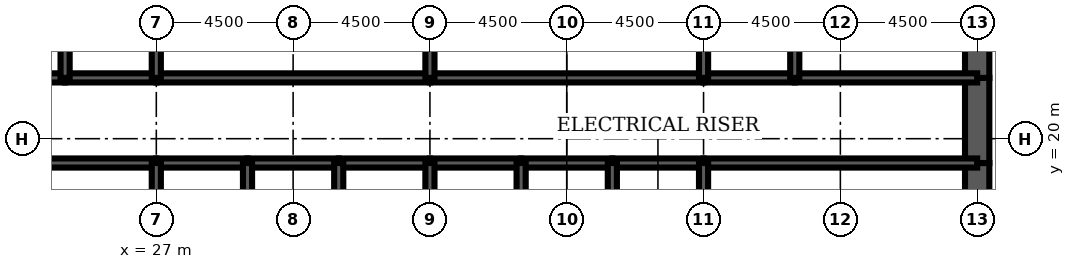
"""IFC4 building model, lengths in metres.
Left out: names, types, materials, properties, quantities, classifications, styles, units other than length and angle.
Written with IfcOpenShell. Run it as: python <this file> out.ifc"""

import sys

from ifc_helpers import new_model, si_unit, direction, frame, frame_2d, origin, place, context, subcontext, project, spatial, rectangle, extrude, element, fill, save


model = new_model("IFC4")
c1 = context("Model", 3, precision=1e-05, world=origin(), true_north=direction((0.0, 1.0)))
c2 = subcontext(c1, "Body", "Model", "MODEL_VIEW")
j1 = project(units=[si_unit("LENGTHUNIT", "METRE"), si_unit("PLANEANGLEUNIT", "RADIAN")], contexts=[c1])
p1 = place(None, origin())
s1 = spatial("IfcSite", under=j1, at=p1, CompositionType="ELEMENT")
p2 = place(p1, origin())
s2 = spatial("IfcBuilding", under=s1, at=p2, CompositionType="ELEMENT")
p3 = place(p2, frame((0.0, 0.0, 236.2)))
s3 = spatial("IfcBuildingStorey", under=s2, at=p3, CompositionType="ELEMENT", Elevation=236.2)
p4 = place(p3, frame((54.0, 16.0, 0.0), z_axis=(0.0, 0.0, 1.0), x_axis=(0.0, 1.0, 0.0)))
e1 = element("IfcWall", 1, at=p4, inside=s3, PredefinedType="SHEAR", context=c2, shape_type="SweptSolid", body=[
    extrude(rectangle(XDim=3.2, YDim=0.8, at=frame_2d((1.6, 0.0))), origin(), (0.0, 0.0, 1.0), 4.2),
])
p5 = place(p3, frame((54.0, 19.2, 0.0), z_axis=(0.0, 0.0, 1.0), x_axis=(0.0, 1.0, 0.0)))
e2 = element("IfcWall", 2, at=p5, inside=s3, PredefinedType="SHEAR", context=c2, shape_type="SweptSolid", body=[
    extrude(rectangle(XDim=2.8, YDim=0.8, at=frame_2d((1.4, 0.0))), origin(), (0.0, 0.0, 1.0), 4.2),
])
p6 = place(p5, frame((0.4, 0.0, 0.0)))
e3 = element("IfcOpeningElement", 3, at=p6, cuts=e2, PredefinedType="OPENING", context=c2, shape_type="SweptSolid", body=[
    extrude(rectangle(XDim=1.8, YDim=2.1, at=frame_2d((0.9, 1.05))), frame((0.0, 0.41, 0.0), z_axis=(0.0, -1.0, 0.0), x_axis=(1.0, 0.0, 0.0)), (0.0, 0.0, 1.0), 0.82),
])
p7 = place(p3, frame((54.0, 22.0, 0.0), z_axis=(0.0, 0.0, 1.0), x_axis=(0.0, 1.0, 0.0)))
e4 = element("IfcWall", 4, at=p7, inside=s3, PredefinedType="SHEAR", context=c2, shape_type="SweptSolid", body=[
    extrude(rectangle(XDim=4.0, YDim=0.8, at=frame_2d((2.0, 0.0))), origin(), (0.0, 0.0, 1.0), 4.2),
])
p8 = place(p3, frame((18.0, 19.2, 0.0), z_axis=(0.0, 0.0, 1.0), x_axis=(1.0, 0.0, 0.0)))
e5 = element("IfcWall", 5, at=p8, inside=s3, PredefinedType="SOLIDWALL", context=c2, shape_type="SweptSolid", body=[
    extrude(rectangle(XDim=9.0, YDim=0.3, at=frame_2d((4.5, 0.0))), origin(), (0.0, 0.0, 1.0), 4.2),
])
p9 = place(p8, frame((0.65, 0.0, 0.0)))
e6 = element("IfcOpeningElement", 6, at=p9, cuts=e5, PredefinedType="OPENING", context=c2, shape_type="SweptSolid", body=[
    extrude(rectangle(XDim=1.0, YDim=2.1, at=frame_2d((0.5, 1.05))), frame((0.0, 0.16, 0.0), z_axis=(0.0, -1.0, 0.0), x_axis=(1.0, 0.0, 0.0)), (0.0, 0.0, 1.0), 0.32),
])
p10 = place(p3, frame((27.0, 19.2, 0.0), z_axis=(0.0, 0.0, 1.0), x_axis=(1.0, 0.0, 0.0)))
e7 = element("IfcWall", 7, at=p10, inside=s3, PredefinedType="SOLIDWALL", context=c2, shape_type="SweptSolid", body=[
    extrude(rectangle(XDim=3.0, YDim=0.3, at=frame_2d((1.5, 0.0))), origin(), (0.0, 0.0, 1.0), 4.2),
])
p11 = place(p10, frame((0.95, 0.0, 0.0)))
e8 = element("IfcOpeningElement", 8, at=p11, cuts=e7, PredefinedType="OPENING", context=c2, shape_type="SweptSolid", body=[
    extrude(rectangle(XDim=1.1, YDim=2.2, at=frame_2d((0.55, 1.1))), frame((0.0, 0.16, 0.0), z_axis=(0.0, -1.0, 0.0), x_axis=(1.0, 0.0, 0.0)), (0.0, 0.0, 1.0), 0.32),
])
p12 = place(p3, frame((30.0, 19.2, 0.0), z_axis=(0.0, 0.0, 1.0), x_axis=(1.0, 0.0, 0.0)))
e9 = element("IfcWall", 9, at=p12, inside=s3, PredefinedType="SOLIDWALL", context=c2, shape_type="SweptSolid", body=[
    extrude(rectangle(XDim=3.0, YDim=0.3, at=frame_2d((1.5, 0.0))), origin(), (0.0, 0.0, 1.0), 4.2),
])
p13 = place(p12, frame((0.95, 0.0, 0.0)))
e10 = element("IfcOpeningElement", 10, at=p13, cuts=e9, PredefinedType="OPENING", context=c2, shape_type="SweptSolid", body=[
    extrude(rectangle(XDim=1.1, YDim=2.2, at=frame_2d((0.55, 1.1))), frame((0.0, 0.16, 0.0), z_axis=(0.0, -1.0, 0.0), x_axis=(1.0, 0.0, 0.0)), (0.0, 0.0, 1.0), 0.32),
])
p14 = place(p3, frame((33.0, 19.2, 0.0), z_axis=(0.0, 0.0, 1.0), x_axis=(1.0, 0.0, 0.0)))
e11 = element("IfcWall", 11, at=p14, inside=s3, PredefinedType="SOLIDWALL", context=c2, shape_type="SweptSolid", body=[
    extrude(rectangle(XDim=3.0, YDim=0.3, at=frame_2d((1.5, 0.0))), origin(), (0.0, 0.0, 1.0), 4.2),
])
p15 = place(p14, frame((0.95, 0.0, 0.0)))
e12 = element("IfcOpeningElement", 12, at=p15, cuts=e11, PredefinedType="OPENING", context=c2, shape_type="SweptSolid", body=[
    extrude(rectangle(XDim=1.1, YDim=2.2, at=frame_2d((0.55, 1.1))), frame((0.0, 0.16, 0.0), z_axis=(0.0, -1.0, 0.0), x_axis=(1.0, 0.0, 0.0)), (0.0, 0.0, 1.0), 0.32),
])
p16 = place(p3, frame((36.0, 19.2, 0.0), z_axis=(0.0, 0.0, 1.0), x_axis=(1.0, 0.0, 0.0)))
e13 = element("IfcWall", 13, at=p16, inside=s3, PredefinedType="SOLIDWALL", context=c2, shape_type="SweptSolid", body=[
    extrude(rectangle(XDim=3.0, YDim=0.3, at=frame_2d((1.5, 0.0))), origin(), (0.0, 0.0, 1.0), 4.2),
])
p17 = place(p16, frame((0.95, 0.0, 0.0)))
e14 = element("IfcOpeningElement", 14, at=p17, cuts=e13, PredefinedType="OPENING", context=c2, shape_type="SweptSolid", body=[
    extrude(rectangle(XDim=1.1, YDim=2.2, at=frame_2d((0.55, 1.1))), frame((0.0, 0.16, 0.0), z_axis=(0.0, -1.0, 0.0), x_axis=(1.0, 0.0, 0.0)), (0.0, 0.0, 1.0), 0.32),
])
p18 = place(p3, frame((39.0, 19.2, 0.0), z_axis=(0.0, 0.0, 1.0), x_axis=(1.0, 0.0, 0.0)))
e15 = element("IfcWall", 15, at=p18, inside=s3, PredefinedType="SOLIDWALL", context=c2, shape_type="SweptSolid", body=[
    extrude(rectangle(XDim=3.0, YDim=0.3, at=frame_2d((1.5, 0.0))), origin(), (0.0, 0.0, 1.0), 4.2),
])
p19 = place(p18, frame((1.0, 0.0, 0.0)))
e16 = element("IfcOpeningElement", 16, at=p19, cuts=e15, PredefinedType="OPENING", context=c2, shape_type="SweptSolid", body=[
    extrude(rectangle(XDim=1.0, YDim=2.1, at=frame_2d((0.5, 1.05))), frame((0.0, 0.16, 0.0), z_axis=(0.0, -1.0, 0.0), x_axis=(1.0, 0.0, 0.0)), (0.0, 0.0, 1.0), 0.32),
])
p20 = place(p3, frame((42.0, 19.2, 0.0), z_axis=(0.0, 0.0, 1.0), x_axis=(1.0, 0.0, 0.0)))
e17 = element("IfcWall", 17, at=p20, inside=s3, PredefinedType="SOLIDWALL", context=c2, shape_type="SweptSolid", body=[
    extrude(rectangle(XDim=3.0, YDim=0.3, at=frame_2d((1.5, 0.0))), origin(), (0.0, 0.0, 1.0), 4.2),
])
p21 = place(p20, frame((1.0, 0.0, 0.0)))
e18 = element("IfcOpeningElement", 18, at=p21, cuts=e17, PredefinedType="OPENING", context=c2, shape_type="SweptSolid", body=[
    extrude(rectangle(XDim=1.0, YDim=2.1, at=frame_2d((0.5, 1.05))), frame((0.0, 0.16, 0.0), z_axis=(0.0, -1.0, 0.0), x_axis=(1.0, 0.0, 0.0)), (0.0, 0.0, 1.0), 0.32),
])
p22 = place(p3, frame((45.0, 19.2, 0.0), z_axis=(0.0, 0.0, 1.0), x_axis=(1.0, 0.0, 0.0)))
e19 = element("IfcWall", 19, at=p22, inside=s3, PredefinedType="SOLIDWALL", context=c2, shape_type="SweptSolid", body=[
    extrude(rectangle(XDim=9.0, YDim=0.3, at=frame_2d((4.5, 0.0))), origin(), (0.0, 0.0, 1.0), 4.2),
])
p23 = place(p22, frame((7.35, 0.0, 0.0)))
e20 = element("IfcOpeningElement", 20, at=p23, cuts=e19, PredefinedType="OPENING", context=c2, shape_type="SweptSolid", body=[
    extrude(rectangle(XDim=1.0, YDim=2.1, at=frame_2d((0.5, 1.05))), frame((0.0, 0.16, 0.0), z_axis=(0.0, -1.0, 0.0), x_axis=(1.0, 0.0, 0.0)), (0.0, 0.0, 1.0), 0.32),
])
p24 = place(p3, frame((18.0, 22.0, 0.0), z_axis=(0.0, 0.0, 1.0), x_axis=(1.0, 0.0, 0.0)))
e21 = element("IfcWall", 21, at=p24, inside=s3, PredefinedType="SOLIDWALL", context=c2, shape_type="SweptSolid", body=[
    extrude(rectangle(XDim=6.0, YDim=0.3, at=frame_2d((3.0, 0.0))), origin(), (0.0, 0.0, 1.0), 4.2),
])
p25 = place(p24, frame((4.4, 0.0, 0.0)))
e22 = element("IfcOpeningElement", 22, at=p25, cuts=e21, PredefinedType="OPENING", context=c2, shape_type="SweptSolid", body=[
    extrude(rectangle(XDim=1.0, YDim=2.1, at=frame_2d((0.5, 1.05))), frame((0.0, 0.16, 0.0), z_axis=(0.0, -1.0, 0.0), x_axis=(1.0, 0.0, 0.0)), (0.0, 0.0, 1.0), 0.32),
])
p26 = place(p24, frame((0.95, 0.0, 0.0)))
e23 = element("IfcOpeningElement", 23, at=p26, cuts=e21, PredefinedType="OPENING", context=c2, shape_type="SweptSolid", body=[
    extrude(rectangle(XDim=1.0, YDim=2.1, at=frame_2d((0.5, 1.05))), frame((0.0, 0.16, 0.0), z_axis=(0.0, -1.0, 0.0), x_axis=(1.0, 0.0, 0.0)), (0.0, 0.0, 1.0), 0.32),
])
p27 = place(p3, frame((24.0, 22.0, 0.0), z_axis=(0.0, 0.0, 1.0), x_axis=(1.0, 0.0, 0.0)))
e24 = element("IfcWall", 24, at=p27, inside=s3, PredefinedType="SOLIDWALL", context=c2, shape_type="SweptSolid", body=[
    extrude(rectangle(XDim=3.0, YDim=0.3, at=frame_2d((1.5, 0.0))), origin(), (0.0, 0.0, 1.0), 4.2),
])
p28 = place(p27, frame((1.0, 0.0, 0.0)))
e25 = element("IfcOpeningElement", 25, at=p28, cuts=e24, PredefinedType="OPENING", context=c2, shape_type="SweptSolid", body=[
    extrude(rectangle(XDim=1.0, YDim=2.1, at=frame_2d((0.5, 1.05))), frame((0.0, 0.16, 0.0), z_axis=(0.0, -1.0, 0.0), x_axis=(1.0, 0.0, 0.0)), (0.0, 0.0, 1.0), 0.32),
])
p29 = place(p3, frame((27.0, 22.0, 0.0), z_axis=(0.0, 0.0, 1.0), x_axis=(1.0, 0.0, 0.0)))
e26 = element("IfcWall", 26, at=p29, inside=s3, PredefinedType="SOLIDWALL", context=c2, shape_type="SweptSolid", body=[
    extrude(rectangle(XDim=9.0, YDim=0.3, at=frame_2d((4.5, 0.0))), origin(), (0.0, 0.0, 1.0), 4.2),
])
p30 = place(p29, frame((4.0, 0.0, 0.0)))
e27 = element("IfcOpeningElement", 27, at=p30, cuts=e26, PredefinedType="OPENING", context=c2, shape_type="SweptSolid", body=[
    extrude(rectangle(XDim=1.0, YDim=2.1, at=frame_2d((0.5, 1.05))), frame((0.0, 0.16, 0.0), z_axis=(0.0, -1.0, 0.0), x_axis=(1.0, 0.0, 0.0)), (0.0, 0.0, 1.0), 0.32),
])
p31 = place(p3, frame((36.0, 22.0, 0.0), z_axis=(0.0, 0.0, 1.0), x_axis=(1.0, 0.0, 0.0)))
e28 = element("IfcWall", 28, at=p31, inside=s3, PredefinedType="SOLIDWALL", context=c2, shape_type="SweptSolid", body=[
    extrude(rectangle(XDim=9.0, YDim=0.3, at=frame_2d((4.5, 0.0))), origin(), (0.0, 0.0, 1.0), 4.2),
])
p32 = place(p31, frame((4.0, 0.0, 0.0)))
e29 = element("IfcOpeningElement", 29, at=p32, cuts=e28, PredefinedType="OPENING", context=c2, shape_type="SweptSolid", body=[
    extrude(rectangle(XDim=1.0, YDim=2.1, at=frame_2d((0.5, 1.05))), frame((0.0, 0.16, 0.0), z_axis=(0.0, -1.0, 0.0), x_axis=(1.0, 0.0, 0.0)), (0.0, 0.0, 1.0), 0.32),
])
p33 = place(p3, frame((45.0, 22.0, 0.0), z_axis=(0.0, 0.0, 1.0), x_axis=(1.0, 0.0, 0.0)))
e30 = element("IfcWall", 30, at=p33, inside=s3, PredefinedType="SOLIDWALL", context=c2, shape_type="SweptSolid", body=[
    extrude(rectangle(XDim=3.0, YDim=0.3, at=frame_2d((1.5, 0.0))), origin(), (0.0, 0.0, 1.0), 4.2),
])
p34 = place(p33, frame((1.0, 0.0, 0.0)))
e31 = element("IfcOpeningElement", 31, at=p34, cuts=e30, PredefinedType="OPENING", context=c2, shape_type="SweptSolid", body=[
    extrude(rectangle(XDim=1.0, YDim=2.1, at=frame_2d((0.5, 1.05))), frame((0.0, 0.16, 0.0), z_axis=(0.0, -1.0, 0.0), x_axis=(1.0, 0.0, 0.0)), (0.0, 0.0, 1.0), 0.32),
])
p35 = place(p3, frame((48.0, 22.0, 0.0), z_axis=(0.0, 0.0, 1.0), x_axis=(1.0, 0.0, 0.0)))
e32 = element("IfcWall", 32, at=p35, inside=s3, PredefinedType="SOLIDWALL", context=c2, shape_type="SweptSolid", body=[
    extrude(rectangle(XDim=6.0, YDim=0.3, at=frame_2d((3.0, 0.0))), origin(), (0.0, 0.0, 1.0), 4.2),
])
p36 = place(p35, frame((2.0, 0.0, 0.0)))
e33 = element("IfcOpeningElement", 33, at=p36, cuts=e32, PredefinedType="OPENING", context=c2, shape_type="SweptSolid", body=[
    extrude(rectangle(XDim=1.0, YDim=2.1, at=frame_2d((0.5, 1.05))), frame((0.0, 0.16, 0.0), z_axis=(0.0, -1.0, 0.0), x_axis=(1.0, 0.0, 0.0)), (0.0, 0.0, 1.0), 0.32),
])
p37 = place(p35, frame((4.05, 0.0, 0.0)))
e34 = element("IfcOpeningElement", 34, at=p37, cuts=e32, PredefinedType="OPENING", context=c2, shape_type="SweptSolid", body=[
    extrude(rectangle(XDim=1.0, YDim=2.1, at=frame_2d((0.5, 1.05))), frame((0.0, 0.16, 0.0), z_axis=(0.0, -1.0, 0.0), x_axis=(1.0, 0.0, 0.0)), (0.0, 0.0, 1.0), 0.32),
])
for number, where, z_axis, x_axis in (
    (35, (27.0, 16.0, 0.0), (0.0, 0.0, 1.0), (0.0, 1.0, 0.0)),
    (36, (30.0, 16.0, 0.0), (0.0, 0.0, 1.0), (0.0, 1.0, 0.0)),
    (37, (33.0, 16.0, 0.0), (0.0, 0.0, 1.0), (0.0, 1.0, 0.0)),
    (38, (36.0, 16.0, 0.0), (0.0, 0.0, 1.0), (0.0, 1.0, 0.0)),
    (39, (39.0, 16.0, 0.0), (0.0, 0.0, 1.0), (0.0, 1.0, 0.0)),
    (40, (42.0, 16.0, 0.0), (0.0, 0.0, 1.0), (0.0, 1.0, 0.0)),
    (41, (45.0, 16.0, 0.0), (0.0, 0.0, 1.0), (0.0, 1.0, 0.0)),
):
    element("IfcWall", number, at=place(p3, frame(where, z_axis=z_axis, x_axis=x_axis)), inside=s3, PredefinedType="SOLIDWALL", context=c2, shape_type="SweptSolid", body=[
        extrude(rectangle(XDim=3.2, YDim=0.3, at=frame_2d((1.6, 0.0))), origin(), (0.0, 0.0, 1.0), 4.2),
    ])
for number, where, z_axis, x_axis in (
    (42, (24.0, 22.0, 0.0), (0.0, 0.0, 1.0), (0.0, 1.0, 0.0)),
    (43, (27.0, 22.0, 0.0), (0.0, 0.0, 1.0), (0.0, 1.0, 0.0)),
    (44, (36.0, 22.0, 0.0), (0.0, 0.0, 1.0), (0.0, 1.0, 0.0)),
    (45, (45.0, 22.0, 0.0), (0.0, 0.0, 1.0), (0.0, 1.0, 0.0)),
    (46, (48.0, 22.0, 0.0), (0.0, 0.0, 1.0), (0.0, 1.0, 0.0)),
):
    element("IfcWall", number, at=place(p3, frame(where, z_axis=z_axis, x_axis=x_axis)), inside=s3, PredefinedType="SOLIDWALL", context=c2, shape_type="SweptSolid", body=[
        extrude(rectangle(XDim=4.0, YDim=0.3, at=frame_2d((2.0, 0.0))), origin(), (0.0, 0.0, 1.0), 4.2),
    ])
p38 = place(p3, frame((51.425, 22.15, 0.0), z_axis=(0.0, 0.0, 1.0), x_axis=(0.0, 1.0, 0.0)))
e47 = element("IfcWall", 47, at=p38, inside=s3, PredefinedType="PARTITIONING", context=c2, shape_type="SweptSolid", body=[
    extrude(rectangle(XDim=3.7, YDim=0.15, at=frame_2d((1.85, 0.0))), origin(), (0.0, 0.0, 1.0), 3.0),
])
p39 = place(p3, frame((24.5, 19.35, 0.0), z_axis=(0.0, 0.0, 1.0), x_axis=(0.0, 1.0, 0.0)))
e48 = element("IfcWall", 48, at=p39, inside=s3, PredefinedType="PARTITIONING", context=c2, shape_type="SweptSolid", body=[
    extrude(rectangle(XDim=2.5, YDim=0.15, at=frame_2d((1.25, 0.0))), origin(), (0.0, 0.0, 1.0), 3.0),
])
p40 = place(p39, frame((1.15, 0.0, 0.0)))
e49 = element("IfcOpeningElement", 49, at=p40, cuts=e48, PredefinedType="OPENING", context=c2, shape_type="SweptSolid", body=[
    extrude(rectangle(XDim=1.0, YDim=2.1, at=frame_2d((0.5, 1.05))), frame((0.0, 0.085, 0.0), z_axis=(0.0, -1.0, 0.0), x_axis=(1.0, 0.0, 0.0)), (0.0, 0.0, 1.0), 0.17),
])
p41 = place(p40, origin())
e50 = element("IfcDoor", 50, at=p41, inside=s3, OperationType="SINGLE_SWING_RIGHT", PredefinedType="DOOR", context=c2, shape_type="SweptSolid", body=[
    extrude(rectangle(XDim=1.0, YDim=2.1, at=frame_2d((0.5, 1.05))), frame((0.0, 0.025, 0.0), z_axis=(0.0, -1.0, 0.0), x_axis=(1.0, 0.0, 0.0)), (0.0, 0.0, 1.0), 0.05),
])
fill(e49, e50)
p42 = place(p11, origin())
e51 = element("IfcDoor", 51, at=p42, inside=s3, OperationType="DOUBLE_DOOR_SLIDING", PredefinedType="USERDEFINED", context=c2, shape_type="SweptSolid", body=[
    extrude(rectangle(XDim=1.1, YDim=2.2, at=frame_2d((0.55, 1.1))), frame((0.0, 0.025, 0.0), z_axis=(0.0, -1.0, 0.0), x_axis=(1.0, 0.0, 0.0)), (0.0, 0.0, 1.0), 0.05),
])
fill(e8, e51)
p43 = place(p13, origin())
e52 = element("IfcDoor", 52, at=p43, inside=s3, OperationType="DOUBLE_DOOR_SLIDING", PredefinedType="USERDEFINED", context=c2, shape_type="SweptSolid", body=[
    extrude(rectangle(XDim=1.1, YDim=2.2, at=frame_2d((0.55, 1.1))), frame((0.0, 0.025, 0.0), z_axis=(0.0, -1.0, 0.0), x_axis=(1.0, 0.0, 0.0)), (0.0, 0.0, 1.0), 0.05),
])
fill(e10, e52)
p44 = place(p15, origin())
e53 = element("IfcDoor", 53, at=p44, inside=s3, OperationType="DOUBLE_DOOR_SLIDING", PredefinedType="USERDEFINED", context=c2, shape_type="SweptSolid", body=[
    extrude(rectangle(XDim=1.1, YDim=2.2, at=frame_2d((0.55, 1.1))), frame((0.0, 0.025, 0.0), z_axis=(0.0, -1.0, 0.0), x_axis=(1.0, 0.0, 0.0)), (0.0, 0.0, 1.0), 0.05),
])
fill(e12, e53)
p45 = place(p17, origin())
e54 = element("IfcDoor", 54, at=p45, inside=s3, OperationType="DOUBLE_DOOR_SLIDING", PredefinedType="USERDEFINED", context=c2, shape_type="SweptSolid", body=[
    extrude(rectangle(XDim=1.1, YDim=2.2, at=frame_2d((0.55, 1.1))), frame((0.0, 0.025, 0.0), z_axis=(0.0, -1.0, 0.0), x_axis=(1.0, 0.0, 0.0)), (0.0, 0.0, 1.0), 0.05),
])
fill(e14, e54)
p46 = place(p23, origin())
e55 = element("IfcDoor", 55, at=p46, inside=s3, OperationType="SINGLE_SWING_RIGHT", PredefinedType="DOOR", context=c2, shape_type="SweptSolid", body=[
    extrude(rectangle(XDim=1.0, YDim=2.1, at=frame_2d((0.5, 1.05))), frame((0.0, 0.025, 0.0), z_axis=(0.0, -1.0, 0.0), x_axis=(1.0, 0.0, 0.0)), (0.0, 0.0, 1.0), 0.05),
])
fill(e20, e55)
p47 = place(p6, origin())
e56 = element("IfcDoor", 56, at=p47, inside=s3, OperationType="SINGLE_SWING_LEFT", PredefinedType="DOOR", context=c2, shape_type="SweptSolid", body=[
    extrude(rectangle(XDim=1.8, YDim=2.1, at=frame_2d((0.9, 1.05))), frame((0.0, 0.4, 0.0), z_axis=(0.0, -1.0, 0.0), x_axis=(1.0, 0.0, 0.0)), (0.0, 0.0, 1.0), 0.8),
])
fill(e3, e56)
p48 = place(p28, origin())
e57 = element("IfcDoor", 57, at=p48, inside=s3, OperationType="SINGLE_SWING_LEFT", PredefinedType="DOOR", context=c2, shape_type="SweptSolid", body=[
    extrude(rectangle(XDim=1.0, YDim=2.1, at=frame_2d((0.5, 1.05))), frame((0.0, 0.025, 0.0), z_axis=(0.0, -1.0, 0.0), x_axis=(1.0, 0.0, 0.0)), (0.0, 0.0, 1.0), 0.05),
])
fill(e25, e57)
p49 = place(p30, origin())
e58 = element("IfcDoor", 58, at=p49, inside=s3, OperationType="SINGLE_SWING_LEFT", PredefinedType="DOOR", context=c2, shape_type="SweptSolid", body=[
    extrude(rectangle(XDim=1.0, YDim=2.1, at=frame_2d((0.5, 1.05))), frame((0.0, 0.025, 0.0), z_axis=(0.0, -1.0, 0.0), x_axis=(1.0, 0.0, 0.0)), (0.0, 0.0, 1.0), 0.05),
])
fill(e27, e58)
p50 = place(p32, origin())
e59 = element("IfcDoor", 59, at=p50, inside=s3, OperationType="SINGLE_SWING_LEFT", PredefinedType="DOOR", context=c2, shape_type="SweptSolid", body=[
    extrude(rectangle(XDim=1.0, YDim=2.1, at=frame_2d((0.5, 1.05))), frame((0.0, 0.025, 0.0), z_axis=(0.0, -1.0, 0.0), x_axis=(1.0, 0.0, 0.0)), (0.0, 0.0, 1.0), 0.05),
])
fill(e29, e59)
p51 = place(p34, origin())
e60 = element("IfcDoor", 60, at=p51, inside=s3, OperationType="SINGLE_SWING_LEFT", PredefinedType="DOOR", context=c2, shape_type="SweptSolid", body=[
    extrude(rectangle(XDim=1.0, YDim=2.1, at=frame_2d((0.5, 1.05))), frame((0.0, 0.025, 0.0), z_axis=(0.0, -1.0, 0.0), x_axis=(1.0, 0.0, 0.0)), (0.0, 0.0, 1.0), 0.05),
])
fill(e31, e60)
p52 = place(p36, origin())
e61 = element("IfcDoor", 61, at=p52, inside=s3, OperationType="SINGLE_SWING_LEFT", PredefinedType="DOOR", context=c2, shape_type="SweptSolid", body=[
    extrude(rectangle(XDim=1.0, YDim=2.1, at=frame_2d((0.5, 1.05))), frame((0.0, 0.025, 0.0), z_axis=(0.0, -1.0, 0.0), x_axis=(1.0, 0.0, 0.0)), (0.0, 0.0, 1.0), 0.05),
])
fill(e33, e61)
p53 = place(p37, origin())
e62 = element("IfcDoor", 62, at=p53, inside=s3, OperationType="SINGLE_SWING_RIGHT", PredefinedType="DOOR", context=c2, shape_type="SweptSolid", body=[
    extrude(rectangle(XDim=1.0, YDim=2.1, at=frame_2d((0.5, 1.05))), frame((0.0, 0.025, 0.0), z_axis=(0.0, -1.0, 0.0), x_axis=(1.0, 0.0, 0.0)), (0.0, 0.0, 1.0), 0.05),
])
fill(e34, e62)
p54 = place(p19, origin())
e63 = element("IfcDoor", 63, at=p54, inside=s3, OperationType="SINGLE_SWING_LEFT", PredefinedType="DOOR", context=c2, shape_type="SweptSolid", body=[
    extrude(rectangle(XDim=1.0, YDim=2.1, at=frame_2d((0.5, 1.05))), frame((0.0, 0.025, 0.0), z_axis=(0.0, -1.0, 0.0), x_axis=(1.0, 0.0, 0.0)), (0.0, 0.0, 1.0), 0.05),
])
fill(e16, e63)
p55 = place(p21, origin())
e64 = element("IfcDoor", 64, at=p55, inside=s3, OperationType="SINGLE_SWING_LEFT", PredefinedType="DOOR", context=c2, shape_type="SweptSolid", body=[
    extrude(rectangle(XDim=1.0, YDim=2.1, at=frame_2d((0.5, 1.05))), frame((0.0, 0.025, 0.0), z_axis=(0.0, -1.0, 0.0), x_axis=(1.0, 0.0, 0.0)), (0.0, 0.0, 1.0), 0.05),
])
fill(e18, e64)
save(model, sys.argv[1])
